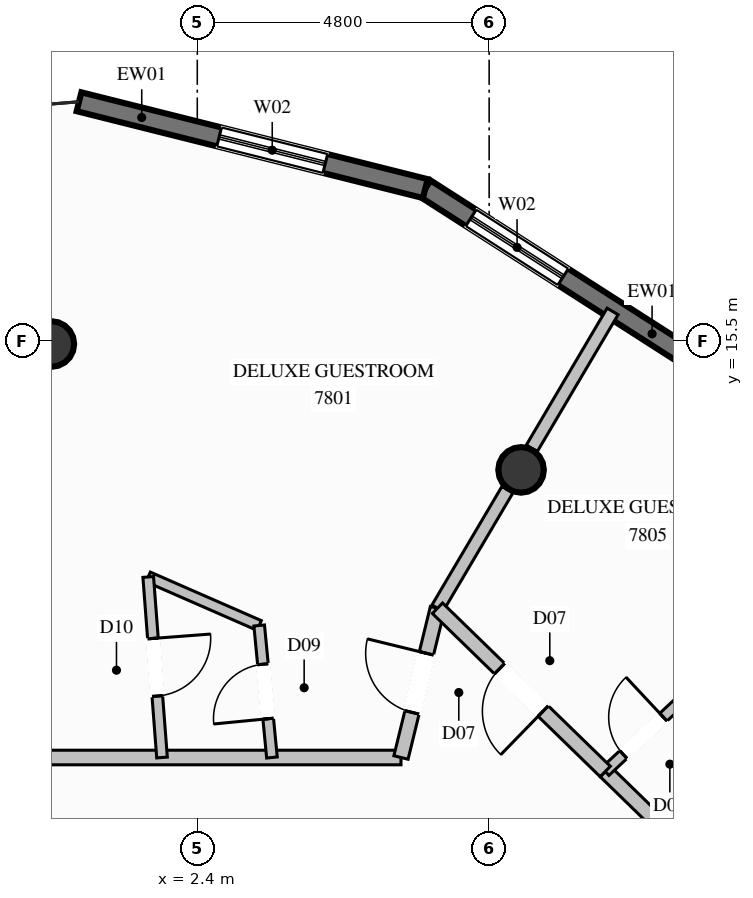
"""IFC4 building model, lengths in metres.
Left out: names, types, materials, properties, quantities, classifications, styles, units other than length and angle.
Written with IfcOpenShell. Run it as: python <this file> out.ifc"""

import sys

from ifc_helpers import new_model, si_unit, direction, frame, frame_2d, origin, origin_2d, place, context, subcontext, project, spatial, rectangle, circle, extrude, element, fill, save


model = new_model("IFC4")
c1 = context("Model", 3, precision=1e-05, world=origin(), true_north=direction((0.0, 1.0)))
c2 = subcontext(c1, "Body", "Model", "MODEL_VIEW")
j1 = project(units=[si_unit("LENGTHUNIT", "METRE"), si_unit("PLANEANGLEUNIT", "RADIAN")], contexts=[c1])
p1 = place(None, origin())
s1 = spatial("IfcSite", under=j1, at=p1, CompositionType="ELEMENT")
p2 = place(p1, origin())
s2 = spatial("IfcBuilding", under=s1, at=p2, CompositionType="ELEMENT")
p3 = place(p2, frame((0.0, 0.0, 293.4)))
s3 = spatial("IfcBuildingStorey", under=s2, at=p3, CompositionType="ELEMENT", Elevation=293.4)
for number, where, z_axis, x_axis in (
    (1, (7.725, 13.38, 0.0), (0.0, 0.0, 1.0), (1.0, 0.0, 0.0)),
    (2, (0.0, 15.45, 0.0), (0.0, 0.0, 1.0), (1.0, 0.0, 0.0)),
):
    element("IfcColumn", number, at=place(p3, frame(where, z_axis=z_axis, x_axis=x_axis)), inside=s3, PredefinedType="COLUMN", context=c2, shape_type="SweptSolid", body=[
        extrude(circle(Radius=0.375, at=origin_2d()), origin(), (0.0, 0.0, 1.0), 3.8),
    ])
p4 = place(p3, frame((6.15, 18.006, 0.0), z_axis=(0.0, 0.0, 1.0), x_axis=(0.842074251432, -0.539361618095, 0.0)))
e3 = element("IfcWall", 3, at=p4, inside=s3, PredefinedType="SOLIDWALL", context=c2, shape_type="SweptSolid", body=[
    extrude(rectangle(XDim=5.917, YDim=0.32, at=frame_2d((2.958, 0.0))), origin(), (0.0, 0.0, 1.0), 3.57),
])
p5 = place(p4, frame((0.892, 0.0, 0.35)))
e4 = element("IfcOpeningElement", 4, at=p5, cuts=e3, PredefinedType="OPENING", context=c2, shape_type="SweptSolid", body=[
    extrude(rectangle(XDim=1.8, YDim=2.6, at=frame_2d((0.9, 1.3))), frame((0.0, 0.17, 0.0), z_axis=(0.0, -1.0, 0.0), x_axis=(1.0, 0.0, 0.0)), (0.0, 0.0, 1.0), 0.34),
])
p6 = place(p3, frame((0.455, 19.434, 0.0), z_axis=(0.0, 0.0, 1.0), x_axis=(0.96997103321, -0.243220465285, 0.0)))
e5 = element("IfcWall", 5, at=p6, inside=s3, PredefinedType="SOLIDWALL", context=c2, shape_type="SweptSolid", body=[
    extrude(rectangle(XDim=5.871, YDim=0.32, at=frame_2d((2.936, 0.0))), origin(), (0.0, 0.0, 1.0), 3.57),
])
p7 = place(p6, frame((2.376, 0.0, 0.35)))
e6 = element("IfcOpeningElement", 6, at=p7, cuts=e5, PredefinedType="OPENING", context=c2, shape_type="SweptSolid", body=[
    extrude(rectangle(XDim=1.8, YDim=2.6, at=frame_2d((0.9, 1.3))), frame((0.0, 0.17, 0.0), z_axis=(0.0, -1.0, 0.0), x_axis=(1.0, 0.0, 0.0)), (0.0, 0.0, 1.0), 0.34),
])
p8 = place(p3, frame((-7.35, 8.65, 0.0), z_axis=(0.0, 0.0, 1.0), x_axis=(1.0, 0.0, 0.0)))
e7 = element("IfcWall", 7, at=p8, inside=s3, PredefinedType="PARTITIONING", context=c2, shape_type="SweptSolid", body=[
    extrude(rectangle(XDim=13.1, YDim=0.24, at=frame_2d((6.55, 0.0))), origin(), (0.0, 0.0, 1.0), 3.57),
])
p9 = place(p3, frame((6.35, 11.105, 0.0), z_axis=(0.0, 0.0, 1.0), x_axis=(0.50828242616, 0.86119044076, 0.0)))
e8 = element("IfcWall", 8, at=p9, inside=s3, PredefinedType="PARTITIONING", context=c2, shape_type="SweptSolid", body=[
    extrude(rectangle(XDim=2.264, YDim=0.21, at=frame_2d((1.132, 0.0))), origin(), (0.0, 0.0, 1.0), 3.011),
])
p10 = place(p3, frame((7.901, 13.734, 0.0), z_axis=(0.0, 0.0, 1.0), x_axis=(0.508235422894, 0.861218180786, 0.0)))
e9 = element("IfcWall", 9, at=p10, inside=s3, PredefinedType="PARTITIONING", context=c2, shape_type="SweptSolid", body=[
    extrude(rectangle(XDim=2.615, YDim=0.21, at=frame_2d((1.308, 0.0))), origin(), (0.0, 0.0, 1.0), 3.57),
])
p11 = place(p3, frame((1.593, 11.619, 0.0), z_axis=(0.0, 0.0, 1.0), x_axis=(0.916261393795, -0.400580900993, 0.0)))
e10 = element("IfcWall", 10, at=p11, inside=s3, PredefinedType="PLUMBINGWALL", context=c2, shape_type="SweptSolid", body=[
    extrude(rectangle(XDim=1.992, YDim=0.175, at=frame_2d((0.996, 0.0))), origin(), (0.0, 0.0, 1.0), 3.57),
])
p12 = place(p3, frame((1.593, 11.619, 0.0), z_axis=(0.0, 0.0, 1.0), x_axis=(0.076251330091, -0.99708862929, 0.0)))
e11 = element("IfcWall", 11, at=p12, inside=s3, PredefinedType="PLUMBINGWALL", context=c2, shape_type="SweptSolid", body=[
    extrude(rectangle(XDim=2.978, YDim=0.175, at=frame_2d((1.489, 0.0))), origin(), (0.0, 0.0, 1.0), 3.57),
])
p13 = place(p12, frame((1.014, 0.0, 0.0)))
e12 = element("IfcOpeningElement", 12, at=p13, cuts=e11, PredefinedType="OPENING", context=c2, shape_type="SweptSolid", body=[
    extrude(rectangle(XDim=0.95, YDim=2.1, at=frame_2d((0.475, 1.05))), frame((0.0, 0.098, 0.0), z_axis=(0.0, -1.0, 0.0), x_axis=(1.0, 0.0, 0.0)), (0.0, 0.0, 1.0), 0.195),
])
p14 = place(p3, frame((3.628, 8.65, 0.0), z_axis=(0.0, 0.0, 1.0), x_axis=(-0.096256231413, 0.995356588321, 0.0)))
e13 = element("IfcWall", 13, at=p14, inside=s3, PredefinedType="PLUMBINGWALL", context=c2, shape_type="SweptSolid", body=[
    extrude(rectangle(XDim=2.181, YDim=0.175, at=frame_2d((1.091, 0.0))), origin(), (0.0, 0.0, 1.0), 3.57),
])
p15 = place(p14, frame((0.641, 0.0, 0.0)))
e14 = element("IfcOpeningElement", 14, at=p15, cuts=e13, PredefinedType="OPENING", context=c2, shape_type="SweptSolid", body=[
    extrude(rectangle(XDim=0.9, YDim=2.1, at=frame_2d((0.45, 1.05))), frame((0.0, 0.098, 0.0), z_axis=(0.0, -1.0, 0.0), x_axis=(1.0, 0.0, 0.0)), (0.0, 0.0, 1.0), 0.195),
])
p16 = place(p3, frame((5.75, 8.65, 0.0), z_axis=(0.0, 0.0, 1.0), x_axis=(0.237440936779, 0.97140197732, 0.0)))
e15 = element("IfcWall", 15, at=p16, inside=s3, PredefinedType="PARTITIONING", context=c2, shape_type="SweptSolid", body=[
    extrude(rectangle(XDim=2.527, YDim=0.24, at=frame_2d((1.264, 0.0))), origin(), (0.0, 0.0, 1.0), 3.57),
])
p17 = place(p16, frame((0.764, 0.0, 0.0)))
e16 = element("IfcOpeningElement", 16, at=p17, cuts=e15, PredefinedType="OPENING", context=c2, shape_type="SweptSolid", body=[
    extrude(rectangle(XDim=1.0, YDim=2.2, at=frame_2d((0.5, 1.1))), frame((0.0, 0.13, 0.0), z_axis=(0.0, -1.0, 0.0), x_axis=(1.0, 0.0, 0.0)), (0.0, 0.0, 1.0), 0.26),
])
p18 = place(p3, frame((11.108, 6.475, 0.0), z_axis=(0.0, 0.0, 1.0), x_axis=(-0.716543745136, 0.697542157369, 0.0)))
e17 = element("IfcWall", 17, at=p18, inside=s3, PredefinedType="PARTITIONING", context=c2, shape_type="SweptSolid", body=[
    extrude(rectangle(XDim=2.788, YDim=0.24, at=frame_2d((1.394, 0.0))), origin(), (0.0, 0.0, 1.0), 3.57),
])
p19 = place(p3, frame((9.11, 8.42, 0.0), z_axis=(0.0, 0.0, 1.0), x_axis=(0.730548551993, 0.682860756803, 0.0)))
e18 = element("IfcWall", 18, at=p19, inside=s3, PredefinedType="PLUMBINGWALL", context=c2, shape_type="SweptSolid", body=[
    extrude(rectangle(XDim=1.715, YDim=0.175, at=frame_2d((0.857, 0.0))), origin(), (0.0, 0.0, 1.0), 3.57),
])
p20 = place(p19, frame((0.408, 0.0, 0.0)))
e19 = element("IfcOpeningElement", 19, at=p20, cuts=e18, PredefinedType="OPENING", context=c2, shape_type="SweptSolid", body=[
    extrude(rectangle(XDim=0.9, YDim=2.1, at=frame_2d((0.45, 1.05))), frame((0.0, 0.098, 0.0), z_axis=(0.0, -1.0, 0.0), x_axis=(1.0, 0.0, 0.0)), (0.0, 0.0, 1.0), 0.195),
])
p21 = place(p3, frame((9.11, 8.42, 0.0), z_axis=(0.0, 0.0, 1.0), x_axis=(-0.716772179107, 0.697307423779, 0.0)))
e20 = element("IfcWall", 20, at=p21, inside=s3, PredefinedType="PARTITIONING", context=c2, shape_type="SweptSolid", body=[
    extrude(rectangle(XDim=3.851, YDim=0.24, at=frame_2d((1.925, 0.0))), origin(), (0.0, 0.0, 1.0), 3.57),
])
p22 = place(p21, frame((1.425, 0.0, 0.0)))
e21 = element("IfcOpeningElement", 21, at=p22, cuts=e20, PredefinedType="OPENING", context=c2, shape_type="SweptSolid", body=[
    extrude(rectangle(XDim=1.0, YDim=2.2, at=frame_2d((0.5, 1.1))), frame((0.0, 0.13, 0.0), z_axis=(0.0, -1.0, 0.0), x_axis=(1.0, 0.0, 0.0)), (0.0, 0.0, 1.0), 0.26),
])
p23 = place(p5, origin())
e22 = element("IfcWindow", 22, at=p23, inside=s3, PartitioningType="SINGLE_PANEL", PredefinedType="WINDOW", context=c2, shape_type="SweptSolid", body=[
    extrude(rectangle(XDim=1.8, YDim=2.6, at=frame_2d((0.9, 1.3))), frame((0.0, 0.03, 0.0), z_axis=(0.0, -1.0, 0.0), x_axis=(1.0, 0.0, 0.0)), (0.0, 0.0, 1.0), 0.06),
])
fill(e4, e22)
p24 = place(p7, origin())
e23 = element("IfcWindow", 23, at=p24, inside=s3, PartitioningType="SINGLE_PANEL", PredefinedType="WINDOW", context=c2, shape_type="SweptSolid", body=[
    extrude(rectangle(XDim=1.8, YDim=2.6, at=frame_2d((0.9, 1.3))), frame((0.0, 0.03, 0.0), z_axis=(0.0, -1.0, 0.0), x_axis=(1.0, 0.0, 0.0)), (0.0, 0.0, 1.0), 0.06),
])
fill(e6, e23)
p25 = place(p15, origin())
e24 = element("IfcDoor", 24, at=p25, inside=s3, OperationType="SINGLE_SWING_LEFT", PredefinedType="DOOR", context=c2, shape_type="SweptSolid", body=[
    extrude(rectangle(XDim=0.9, YDim=2.1, at=frame_2d((0.45, 1.05))), frame((0.0, 0.025, 0.0), z_axis=(0.0, -1.0, 0.0), x_axis=(1.0, 0.0, 0.0)), (0.0, 0.0, 1.0), 0.05),
])
fill(e14, e24)
p26 = place(p17, origin())
e25 = element("IfcDoor", 25, at=p26, inside=s3, OperationType="SINGLE_SWING_RIGHT", PredefinedType="DOOR", context=c2, shape_type="SweptSolid", body=[
    extrude(rectangle(XDim=1.0, YDim=2.2, at=frame_2d((0.5, 1.1))), frame((0.0, 0.025, 0.0), z_axis=(0.0, -1.0, 0.0), x_axis=(1.0, 0.0, 0.0)), (0.0, 0.0, 1.0), 0.05),
])
fill(e16, e25)
p27 = place(p13, origin())
e26 = element("IfcDoor", 26, at=p27, inside=s3, OperationType="SINGLE_SWING_LEFT", PredefinedType="DOOR", context=c2, shape_type="SweptSolid", body=[
    extrude(rectangle(XDim=0.95, YDim=2.1, at=frame_2d((0.475, 1.05))), frame((0.0, 0.025, 0.0), z_axis=(0.0, -1.0, 0.0), x_axis=(1.0, 0.0, 0.0)), (0.0, 0.0, 1.0), 0.05),
])
fill(e12, e26)
p28 = place(p20, origin())
e27 = element("IfcDoor", 27, at=p28, inside=s3, OperationType="SINGLE_SWING_RIGHT", PredefinedType="DOOR", context=c2, shape_type="SweptSolid", body=[
    extrude(rectangle(XDim=0.9, YDim=2.1, at=frame_2d((0.45, 1.05))), frame((0.0, 0.025, 0.0), z_axis=(0.0, -1.0, 0.0), x_axis=(1.0, 0.0, 0.0)), (0.0, 0.0, 1.0), 0.05),
])
fill(e19, e27)
p29 = place(p22, origin())
e28 = element("IfcDoor", 28, at=p29, inside=s3, OperationType="SINGLE_SWING_LEFT", PredefinedType="DOOR", context=c2, shape_type="SweptSolid", body=[
    extrude(rectangle(XDim=1.0, YDim=2.2, at=frame_2d((0.5, 1.1))), frame((0.0, 0.025, 0.0), z_axis=(0.0, -1.0, 0.0), x_axis=(1.0, 0.0, 0.0)), (0.0, 0.0, 1.0), 0.05),
])
fill(e21, e28)
save(model, sys.argv[1])
